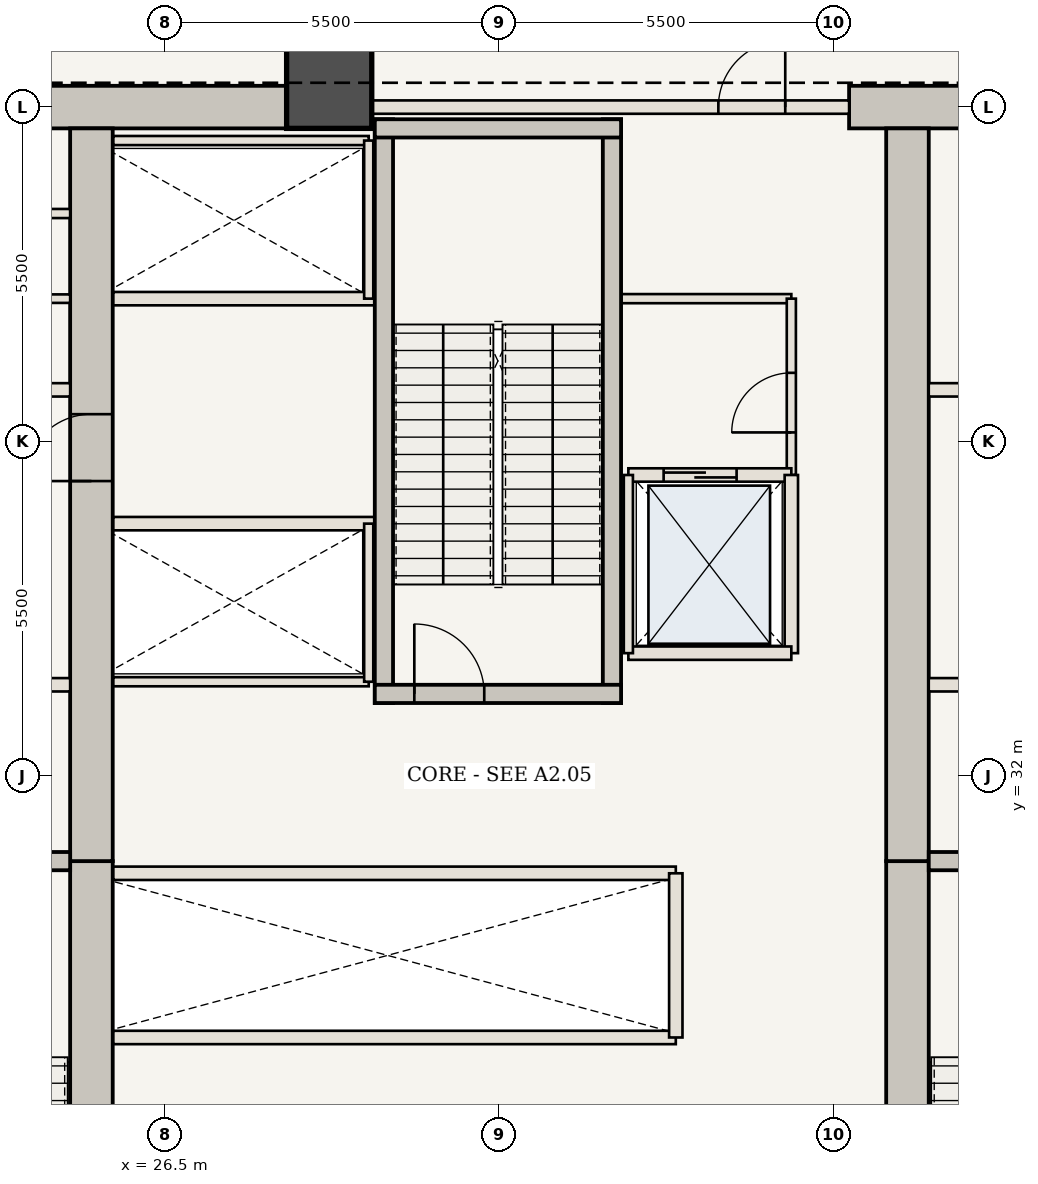
"""IFC4 building model, lengths in metres.
Left out: names, types, materials, properties, quantities, classifications, styles, units other than length and angle.
Written with IfcOpenShell. Run it as: python <this file> out.ifc"""

import sys

from ifc_helpers import new_model, si_unit, direction, frame, frame_2d, origin, origin_2d, place, context, subcontext, project, spatial, rectangle, extrude, element, fill, save


model = new_model("IFC4")
c1 = context("Model", 3, precision=1e-05, world=origin(), true_north=direction((0.0, 1.0)))
c2 = subcontext(c1, "Body", "Model", "MODEL_VIEW")
j1 = project(units=[si_unit("LENGTHUNIT", "METRE"), si_unit("PLANEANGLEUNIT", "RADIAN")], contexts=[c1])
p1 = place(None, origin())
s1 = spatial("IfcSite", under=j1, at=p1, CompositionType="ELEMENT")
p2 = place(p1, origin())
s2 = spatial("IfcBuilding", under=s1, at=p2, CompositionType="ELEMENT")
p3 = place(p2, frame((0.0, 0.0, 12.25)))
s3 = spatial("IfcBuildingStorey", under=s2, at=p3, CompositionType="ELEMENT", Elevation=12.25)
p4 = place(p3, frame((21.41, 43.0, 0.0), z_axis=(0.0, 0.0, 1.0), x_axis=(1.0, 0.0, 0.0)))
e1 = element("IfcWall", 1, at=p4, inside=s3, PredefinedType="SHEAR", context=c2, shape_type="SweptSolid", body=[
    extrude(rectangle(XDim=8.24, YDim=0.7, at=frame_2d((4.12, 0.0))), origin(), (0.0, 0.0, 1.0), 5.6),
])
p5 = place(p3, frame((37.75, 43.0, 0.0), z_axis=(0.0, 0.0, 1.0), x_axis=(1.0, 0.0, 0.0)))
e2 = element("IfcWall", 2, at=p5, inside=s3, PredefinedType="SHEAR", context=c2, shape_type="SweptSolid", body=[
    extrude(rectangle(XDim=4.84, YDim=0.7, at=frame_2d((2.42, 0.0))), origin(), (0.0, 0.0, 1.0), 5.6),
])
p6 = place(p3, frame((25.29, 21.3, 0.0), z_axis=(0.0, 0.0, 1.0), x_axis=(0.0, 1.0, 0.0)))
e3 = element("IfcWall", 3, at=p6, inside=s3, PredefinedType="SHEAR", context=c2, shape_type="SweptSolid", body=[
    extrude(rectangle(XDim=9.3, YDim=0.7, at=frame_2d((4.65, 0.0))), origin(), (0.0, 0.0, 1.0), 5.6),
])
p7 = place(p3, frame((25.29, 30.6, 0.0), z_axis=(0.0, 0.0, 1.0), x_axis=(0.0, 1.0, 0.0)))
e4 = element("IfcWall", 4, at=p7, inside=s3, PredefinedType="SHEAR", context=c2, shape_type="SweptSolid", body=[
    extrude(rectangle(XDim=12.05, YDim=0.7, at=frame_2d((6.025, 0.0))), origin(), (0.0, 0.0, 1.0), 5.6),
])
p8 = place(p7, frame((6.25, 0.0, 0.0)))
e5 = element("IfcOpeningElement", 5, at=p8, cuts=e4, PredefinedType="OPENING", context=c2, shape_type="SweptSolid", body=[
    extrude(rectangle(XDim=1.1, YDim=2.15, at=frame_2d((0.55, 1.075))), frame((0.0, 0.36, 0.0), z_axis=(0.0, -1.0, 0.0), x_axis=(1.0, 0.0, 0.0)), (0.0, 0.0, 1.0), 0.72),
])
p9 = place(p3, frame((38.71, 21.3, 0.0), z_axis=(0.0, 0.0, 1.0), x_axis=(0.0, 1.0, 0.0)))
e6 = element("IfcWall", 6, at=p9, inside=s3, PredefinedType="SHEAR", context=c2, shape_type="SweptSolid", body=[
    extrude(rectangle(XDim=9.3, YDim=0.7, at=frame_2d((4.65, 0.0))), origin(), (0.0, 0.0, 1.0), 5.6),
])
p10 = place(p3, frame((38.71, 30.6, 0.0), z_axis=(0.0, 0.0, 1.0), x_axis=(0.0, 1.0, 0.0)))
e7 = element("IfcWall", 7, at=p10, inside=s3, PredefinedType="SHEAR", context=c2, shape_type="SweptSolid", body=[
    extrude(rectangle(XDim=12.05, YDim=0.7, at=frame_2d((6.025, 0.0))), origin(), (0.0, 0.0, 1.0), 5.6),
])
p11 = place(p3, frame((29.2, 43.35, 0.0), z_axis=(0.0, 0.0, 1.0), x_axis=(1.0, 0.0, 0.0)))
e8 = element("IfcColumn", 8, at=p11, inside=s3, PredefinedType="COLUMN", context=c2, shape_type="SweptSolid", body=[
    extrude(rectangle(XDim=1.4, YDim=1.4, at=origin_2d()), origin(), (0.0, 0.0, 1.0), 5.6),
])
for number, where, z_axis, x_axis in (
    (9, (21.41, 30.6, 0.0), (0.0, 0.0, 1.0), (1.0, 0.0, 0.0)),
    (10, (39.06, 30.6, 0.0), (0.0, 0.0, 1.0), (1.0, 0.0, 0.0)),
):
    element("IfcWall", number, at=place(p3, frame(where, z_axis=z_axis, x_axis=x_axis)), inside=s3, PredefinedType="SHEAR", context=c2, shape_type="SweptSolid", body=[
        extrude(rectangle(XDim=3.53, YDim=0.3, at=frame_2d((1.765, 0.0))), origin(), (0.0, 0.0, 1.0), 5.36),
    ])
p12 = place(p3, frame((21.41, 33.5, 0.0), z_axis=(0.0, 0.0, 1.0), x_axis=(1.0, 0.0, 0.0)))
e11 = element("IfcWall", 11, at=p12, inside=s3, PredefinedType="STANDARD", context=c2, shape_type="SweptSolid", body=[
    extrude(rectangle(XDim=3.53, YDim=0.22, at=frame_2d((1.765, 0.0))), origin(), (0.0, 0.0, 1.0), 5.36),
])
p13 = place(p12, frame((0.75, 0.0, 0.0)))
e12 = element("IfcOpeningElement", 12, at=p13, cuts=e11, PredefinedType="OPENING", context=c2, shape_type="SweptSolid", body=[
    extrude(rectangle(XDim=1.2, YDim=2.2, at=frame_2d((0.6, 1.1))), frame((0.0, 0.12, 0.0), z_axis=(0.0, -1.0, 0.0), x_axis=(1.0, 0.0, 0.0)), (0.0, 0.0, 1.0), 0.24),
])
p14 = place(p3, frame((39.06, 33.5, 0.0), z_axis=(0.0, 0.0, 1.0), x_axis=(1.0, 0.0, 0.0)))
e13 = element("IfcWall", 13, at=p14, inside=s3, PredefinedType="STANDARD", context=c2, shape_type="SweptSolid", body=[
    extrude(rectangle(XDim=3.53, YDim=0.22, at=frame_2d((1.765, 0.0))), origin(), (0.0, 0.0, 1.0), 5.36),
])
p15 = place(p14, frame((1.55, 0.0, 0.0)))
e14 = element("IfcOpeningElement", 14, at=p15, cuts=e13, PredefinedType="OPENING", context=c2, shape_type="SweptSolid", body=[
    extrude(rectangle(XDim=1.2, YDim=2.2, at=frame_2d((0.6, 1.1))), frame((0.0, 0.12, 0.0), z_axis=(0.0, -1.0, 0.0), x_axis=(1.0, 0.0, 0.0)), (0.0, 0.0, 1.0), 0.24),
])
for number, where, z_axis, x_axis in (
    (15, (21.41, 38.35, 0.0), (0.0, 0.0, 1.0), (1.0, 0.0, 0.0)),
    (16, (39.06, 38.35, 0.0), (0.0, 0.0, 1.0), (1.0, 0.0, 0.0)),
):
    element("IfcWall", number, at=place(p3, frame(where, z_axis=z_axis, x_axis=x_axis)), inside=s3, PredefinedType="STANDARD", context=c2, shape_type="SweptSolid", body=[
        extrude(rectangle(XDim=3.53, YDim=0.22, at=frame_2d((1.765, 0.0))), origin(), (0.0, 0.0, 1.0), 5.36),
    ])
p16 = place(p3, frame((21.41, 39.85, 0.0), z_axis=(0.0, 0.0, 1.0), x_axis=(1.0, 0.0, 0.0)))
e17 = element("IfcWall", 17, at=p16, inside=s3, PredefinedType="STANDARD", context=c2, shape_type="SweptSolid", body=[
    extrude(rectangle(XDim=3.53, YDim=0.14, at=frame_2d((1.765, 0.0))), origin(), (0.0, 0.0, 1.0), 5.36),
])
p17 = place(p3, frame((21.41, 41.25, 0.0), z_axis=(0.0, 0.0, 1.0), x_axis=(1.0, 0.0, 0.0)))
e18 = element("IfcWall", 18, at=p17, inside=s3, PredefinedType="STANDARD", context=c2, shape_type="SweptSolid", body=[
    extrude(rectangle(XDim=3.53, YDim=0.15, at=frame_2d((1.765, 0.0))), origin(), (0.0, 0.0, 1.0), 5.36),
])
p18 = place(p3, frame((34.0, 39.85, 0.0), z_axis=(0.0, 0.0, 1.0), x_axis=(1.0, 0.0, 0.0)))
e19 = element("IfcWall", 19, at=p18, inside=s3, PredefinedType="STANDARD", context=c2, shape_type="SweptSolid", body=[
    extrude(rectangle(XDim=2.8, YDim=0.15, at=frame_2d((1.4, 0.0))), origin(), (0.0, 0.0, 1.0), 5.36),
])
p19 = place(p3, frame((36.8, 36.95, 0.0), z_axis=(0.0, 0.0, 1.0), x_axis=(0.0, 1.0, 0.0)))
e20 = element("IfcWall", 20, at=p19, inside=s3, PredefinedType="STANDARD", context=c2, shape_type="SweptSolid", body=[
    extrude(rectangle(XDim=2.9, YDim=0.15, at=frame_2d((1.45, 0.0))), origin(), (0.0, 0.0, 1.0), 5.36),
])
p20 = place(p19, frame((0.7, 0.0, 0.0)))
e21 = element("IfcOpeningElement", 21, at=p20, cuts=e20, PredefinedType="OPENING", context=c2, shape_type="SweptSolid", body=[
    extrude(rectangle(XDim=0.98, YDim=2.2, at=frame_2d((0.49, 1.1))), frame((0.0, 0.085, 0.0), z_axis=(0.0, -1.0, 0.0), x_axis=(1.0, 0.0, 0.0)), (0.0, 0.0, 1.0), 0.17),
])
for number, where, z_axis, x_axis in (
    (22, (25.65, 27.7, 0.0), (0.0, 0.0, 1.0), (1.0, 0.0, 0.0)),
    (23, (25.65, 30.4, 0.0), (0.0, 0.0, 1.0), (1.0, 0.0, 0.0)),
):
    element("IfcWall", number, at=place(p3, frame(where, z_axis=z_axis, x_axis=x_axis)), inside=s3, PredefinedType="STANDARD", context=c2, shape_type="SweptSolid", body=[
        extrude(rectangle(XDim=9.25, YDim=0.22, at=frame_2d((4.625, 0.0))), origin(), (0.0, 0.0, 1.0), 5.36),
    ])
p21 = place(p3, frame((34.9, 27.7, 0.0), z_axis=(0.0, 0.0, 1.0), x_axis=(0.0, 1.0, 0.0)))
e24 = element("IfcWall", 24, at=p21, inside=s3, PredefinedType="STANDARD", context=c2, shape_type="SweptSolid", body=[
    extrude(rectangle(XDim=2.7, YDim=0.22, at=frame_2d((1.35, 0.0))), origin(), (0.0, 0.0, 1.0), 5.36),
])
p22 = place(p3, frame((25.65, 36.15, 0.0), z_axis=(0.0, 0.0, 1.0), x_axis=(1.0, 0.0, 0.0)))
e25 = element("IfcWall", 25, at=p22, inside=s3, PredefinedType="STANDARD", context=c2, shape_type="SweptSolid", body=[
    extrude(rectangle(XDim=4.3, YDim=0.22, at=frame_2d((2.15, 0.0))), origin(), (0.0, 0.0, 1.0), 5.36),
])
p23 = place(p3, frame((25.65, 33.55, 0.0), z_axis=(0.0, 0.0, 1.0), x_axis=(1.0, 0.0, 0.0)))
e26 = element("IfcWall", 26, at=p23, inside=s3, PredefinedType="STANDARD", context=c2, shape_type="SweptSolid", body=[
    extrude(rectangle(XDim=4.2, YDim=0.15, at=frame_2d((2.1, 0.0))), origin(), (0.0, 0.0, 1.0), 5.36),
])
p24 = place(p3, frame((29.85, 33.55, 0.0), z_axis=(0.0, 0.0, 1.0), x_axis=(0.0, 1.0, 0.0)))
e27 = element("IfcWall", 27, at=p24, inside=s3, PredefinedType="STANDARD", context=c2, shape_type="SweptSolid", body=[
    extrude(rectangle(XDim=2.6, YDim=0.15, at=frame_2d((1.3, 0.0))), origin(), (0.0, 0.0, 1.0), 5.36),
])
p25 = place(p3, frame((25.65, 39.85, 0.0), z_axis=(0.0, 0.0, 1.0), x_axis=(1.0, 0.0, 0.0)))
e28 = element("IfcWall", 28, at=p25, inside=s3, PredefinedType="STANDARD", context=c2, shape_type="SweptSolid", body=[
    extrude(rectangle(XDim=4.3, YDim=0.22, at=frame_2d((2.15, 0.0))), origin(), (0.0, 0.0, 1.0), 5.36),
])
p26 = place(p3, frame((25.65, 42.45, 0.0), z_axis=(0.0, 0.0, 1.0), x_axis=(1.0, 0.0, 0.0)))
e29 = element("IfcWall", 29, at=p26, inside=s3, PredefinedType="STANDARD", context=c2, shape_type="SweptSolid", body=[
    extrude(rectangle(XDim=4.2, YDim=0.15, at=frame_2d((2.1, 0.0))), origin(), (0.0, 0.0, 1.0), 5.36),
])
p27 = place(p3, frame((29.85, 39.85, 0.0), z_axis=(0.0, 0.0, 1.0), x_axis=(0.0, 1.0, 0.0)))
e30 = element("IfcWall", 30, at=p27, inside=s3, PredefinedType="STANDARD", context=c2, shape_type="SweptSolid", body=[
    extrude(rectangle(XDim=2.6, YDim=0.15, at=frame_2d((1.3, 0.0))), origin(), (0.0, 0.0, 1.0), 5.36),
])
for number, where, z_axis, x_axis in (
    (31, (30.1, 33.2, 0.0), (0.0, 0.0, 1.0), (0.0, 1.0, 0.0)),
    (32, (33.85, 33.2, 0.0), (0.0, 0.0, 1.0), (0.0, 1.0, 0.0)),
):
    element("IfcWall", number, at=place(p3, frame(where, z_axis=z_axis, x_axis=x_axis)), inside=s3, PredefinedType="SHEAR", context=c2, shape_type="SweptSolid", body=[
        extrude(rectangle(XDim=9.6, YDim=0.3, at=frame_2d((4.8, 0.0))), origin(), (0.0, 0.0, 1.0), 5.36),
    ])
p28 = place(p3, frame((29.95, 33.35, 0.0), z_axis=(0.0, 0.0, 1.0), x_axis=(1.0, 0.0, 0.0)))
e33 = element("IfcWall", 33, at=p28, inside=s3, PredefinedType="SHEAR", context=c2, shape_type="SweptSolid", body=[
    extrude(rectangle(XDim=4.05, YDim=0.3, at=frame_2d((2.025, 0.0))), origin(), (0.0, 0.0, 1.0), 5.36),
])
p29 = place(p28, frame((0.65, 0.0, 0.0)))
e34 = element("IfcOpeningElement", 34, at=p29, cuts=e33, PredefinedType="OPENING", context=c2, shape_type="SweptSolid", body=[
    extrude(rectangle(XDim=1.15, YDim=2.15, at=frame_2d((0.575, 1.075))), frame((0.0, 0.16, 0.0), z_axis=(0.0, -1.0, 0.0), x_axis=(1.0, 0.0, 0.0)), (0.0, 0.0, 1.0), 0.32),
])
p30 = place(p3, frame((29.95, 42.65, 0.0), z_axis=(0.0, 0.0, 1.0), x_axis=(1.0, 0.0, 0.0)))
e35 = element("IfcWall", 35, at=p30, inside=s3, PredefinedType="SHEAR", context=c2, shape_type="SweptSolid", body=[
    extrude(rectangle(XDim=4.05, YDim=0.3, at=frame_2d((2.025, 0.0))), origin(), (0.0, 0.0, 1.0), 5.36),
])
p31 = place(p3, frame((29.65, 43.0, 0.0), z_axis=(0.0, 0.0, 1.0), x_axis=(1.0, 0.0, 0.0)))
e36 = element("IfcWall", 36, at=p31, inside=s3, PredefinedType="STANDARD", context=c2, shape_type="SweptSolid", body=[
    extrude(rectangle(XDim=8.1, YDim=0.22, at=frame_2d((4.05, 0.0))), origin(), (0.0, 0.0, 1.0), 5.36),
])
p32 = place(p31, frame((5.95, 0.0, 0.0)))
e37 = element("IfcOpeningElement", 37, at=p32, cuts=e36, PredefinedType="OPENING", context=c2, shape_type="SweptSolid", body=[
    extrude(rectangle(XDim=1.1, YDim=2.15, at=frame_2d((0.55, 1.075))), frame((0.0, 0.12, 0.0), z_axis=(0.0, -1.0, 0.0), x_axis=(1.0, 0.0, 0.0)), (0.0, 0.0, 1.0), 0.24),
])
p33 = place(p3, frame((34.12, 36.95, 0.0), z_axis=(0.0, 0.0, 1.0), x_axis=(1.0, 0.0, 0.0)))
e38 = element("IfcWall", 38, at=p33, inside=s3, PredefinedType="STANDARD", context=c2, shape_type="SweptSolid", body=[
    extrude(rectangle(XDim=2.68, YDim=0.22, at=frame_2d((1.34, 0.0))), origin(), (0.0, 0.0, 1.0), 5.36),
])
p34 = place(p33, frame((0.58, 0.0, 0.0)))
e39 = element("IfcOpeningElement", 39, at=p34, cuts=e38, PredefinedType="OPENING", context=c2, shape_type="SweptSolid", body=[
    extrude(rectangle(XDim=1.2, YDim=2.2, at=frame_2d((0.6, 1.1))), frame((0.0, 0.12, 0.0), z_axis=(0.0, -1.0, 0.0), x_axis=(1.0, 0.0, 0.0)), (0.0, 0.0, 1.0), 0.24),
])
p35 = place(p3, frame((36.8, 34.02, 0.0), z_axis=(0.0, 0.0, 1.0), x_axis=(0.0, 1.0, 0.0)))
e40 = element("IfcWall", 40, at=p35, inside=s3, PredefinedType="STANDARD", context=c2, shape_type="SweptSolid", body=[
    extrude(rectangle(XDim=2.93, YDim=0.22, at=frame_2d((1.465, 0.0))), origin(), (0.0, 0.0, 1.0), 5.36),
])
p36 = place(p3, frame((34.12, 34.02, 0.0), z_axis=(0.0, 0.0, 1.0), x_axis=(1.0, 0.0, 0.0)))
e41 = element("IfcWall", 41, at=p36, inside=s3, PredefinedType="STANDARD", context=c2, shape_type="SweptSolid", body=[
    extrude(rectangle(XDim=2.68, YDim=0.22, at=frame_2d((1.34, 0.0))), origin(), (0.0, 0.0, 1.0), 5.36),
])
p37 = place(p3, frame((34.12, 34.02, 0.0), z_axis=(0.0, 0.0, 1.0), x_axis=(0.0, 1.0, 0.0)))
e42 = element("IfcWall", 42, at=p37, inside=s3, PredefinedType="STANDARD", context=c2, shape_type="SweptSolid", body=[
    extrude(rectangle(XDim=2.93, YDim=0.15, at=frame_2d((1.465, 0.0))), origin(), (0.0, 0.0, 1.0), 5.36),
])
p38 = place(p8, origin())
e43 = element("IfcDoor", 43, at=p38, inside=s3, OperationType="SINGLE_SWING_LEFT", PredefinedType="DOOR", context=c2, shape_type="SweptSolid", body=[
    extrude(rectangle(XDim=1.1, YDim=2.15, at=frame_2d((0.55, 1.075))), frame((0.0, 0.025, 0.0), z_axis=(0.0, -1.0, 0.0), x_axis=(1.0, 0.0, 0.0)), (0.0, 0.0, 1.0), 0.05),
])
fill(e5, e43)
p39 = place(p20, origin())
e44 = element("IfcDoor", 44, at=p39, inside=s3, OperationType="SINGLE_SWING_LEFT", PredefinedType="DOOR", context=c2, shape_type="SweptSolid", body=[
    extrude(rectangle(XDim=0.98, YDim=2.2, at=frame_2d((0.49, 1.1))), frame((0.0, 0.025, 0.0), z_axis=(0.0, -1.0, 0.0), x_axis=(1.0, 0.0, 0.0)), (0.0, 0.0, 1.0), 0.05),
])
fill(e21, e44)
p40 = place(p29, origin())
e45 = element("IfcDoor", 45, at=p40, inside=s3, OperationType="SINGLE_SWING_LEFT", PredefinedType="DOOR", context=c2, shape_type="SweptSolid", body=[
    extrude(rectangle(XDim=1.15, YDim=2.15, at=frame_2d((0.575, 1.075))), frame((0.0, 0.025, 0.0), z_axis=(0.0, -1.0, 0.0), x_axis=(1.0, 0.0, 0.0)), (0.0, 0.0, 1.0), 0.05),
])
fill(e34, e45)
p41 = place(p32, origin())
e46 = element("IfcDoor", 46, at=p41, inside=s3, OperationType="SINGLE_SWING_RIGHT", PredefinedType="DOOR", context=c2, shape_type="SweptSolid", body=[
    extrude(rectangle(XDim=1.1, YDim=2.15, at=frame_2d((0.55, 1.075))), frame((0.0, 0.025, 0.0), z_axis=(0.0, -1.0, 0.0), x_axis=(1.0, 0.0, 0.0)), (0.0, 0.0, 1.0), 0.05),
])
fill(e37, e46)
p42 = place(p34, origin())
e47 = element("IfcDoor", 47, at=p42, inside=s3, OperationType="DOUBLE_DOOR_SLIDING", PredefinedType="DOOR", context=c2, shape_type="SweptSolid", body=[
    extrude(rectangle(XDim=1.2, YDim=2.2, at=frame_2d((0.6, 1.1))), frame((0.0, 0.025, 0.0), z_axis=(0.0, -1.0, 0.0), x_axis=(1.0, 0.0, 0.0)), (0.0, 0.0, 1.0), 0.05),
])
fill(e39, e47)
save(model, sys.argv[1])
